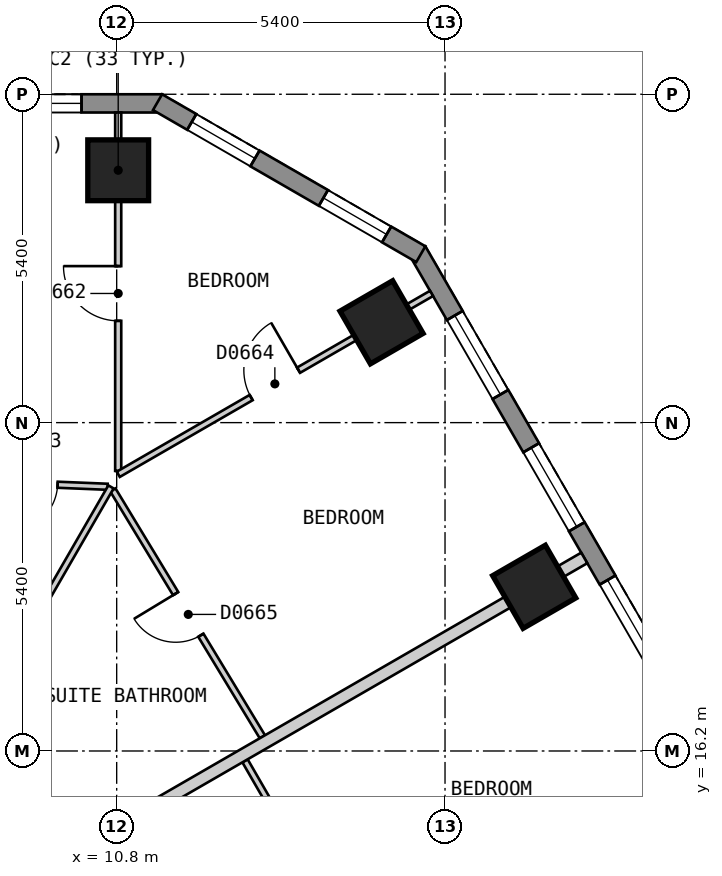
"""IFC4 building model, lengths in metres.
Left out: names, types, materials, properties, quantities, classifications, styles, units other than length and angle.
Written with IfcOpenShell. Run it as: python <this file> out.ifc"""

import sys

from ifc_helpers import new_model, si_unit, direction, frame, frame_2d, origin, origin_2d, place, context, subcontext, project, spatial, polyline, rectangle, outline, extrude, element, fill, save


model = new_model("IFC4")
c1 = context("Model", 3, precision=1e-05, world=origin(), true_north=direction((0.0, 1.0)))
c2 = subcontext(c1, "Body", "Model", "MODEL_VIEW")
j1 = project(units=[si_unit("LENGTHUNIT", "METRE"), si_unit("PLANEANGLEUNIT", "RADIAN")], contexts=[c1])
p1 = place(None, origin())
s1 = spatial("IfcSite", under=j1, at=p1, CompositionType="ELEMENT")
p2 = place(p1, origin())
s2 = spatial("IfcBuilding", under=s1, at=p2, CompositionType="ELEMENT")
p3 = place(p2, frame((0.0, 0.0, 81.0)))
s3 = spatial("IfcBuildingStorey", under=s2, at=p3, CompositionType="ELEMENT", Elevation=81.0)
for number, where, z_axis, x_axis in (
    (1, (10.825, 25.75, 0.0), (0.0, 0.0, 1.0), (-1.0, 0.0, 0.0)),
    (2, (17.667, 18.9, 0.0), (0.0, 0.0, 1.0), (-0.5, 0.866, 0.0)),
    (3, (15.156, 23.25, 0.0), (0.0, 0.0, 1.0), (-0.5, 0.866, 0.0)),
):
    element("IfcColumn", number, at=place(p3, frame(where, z_axis=z_axis, x_axis=x_axis)), inside=s3, PredefinedType="COLUMN", context=c2, shape_type="SweptSolid", body=[
        extrude(rectangle(XDim=1.0, YDim=1.0, at=origin_2d()), origin(), (0.0, 0.0, 1.0), 3.0),
    ])
p4 = place(p3, frame((11.547, 26.85, 0.0), z_axis=(0.0, 0.0, 1.0), x_axis=(-1.0, 0.0, 0.0)))
e4 = element("IfcWall", 4, at=p4, inside=s3, PredefinedType="SOLIDWALL", context=c2, shape_type="SweptSolid", body=[
    extrude(outline(polyline([(0.0, -0.15), (23.094, -0.15), (23.014, 0.15), (0.08, 0.15), (0.0, -0.15)])), origin(), (0.0, 0.0, 1.0), 2.7),
])
p5 = place(p4, frame((1.325, 0.0, 0.15)))
e5 = element("IfcOpeningElement", 5, at=p5, cuts=e4, PredefinedType="OPENING", context=c2, shape_type="SweptSolid", body=[
    extrude(rectangle(XDim=1.5, YDim=2.1, at=frame_2d((0.75, 1.05))), frame((0.0, 0.16, 0.0), z_axis=(0.0, -1.0, 0.0), x_axis=(1.0, 0.0, 0.0)), (0.0, 0.0, 1.0), 0.32),
])
p6 = place(p4, frame((4.032, 0.0, 0.15)))
e6 = element("IfcOpeningElement", 6, at=p6, cuts=e4, PredefinedType="OPENING", context=c2, shape_type="SweptSolid", body=[
    extrude(rectangle(XDim=1.5, YDim=2.1, at=frame_2d((0.75, 1.05))), frame((0.0, 0.16, 0.0), z_axis=(0.0, -1.0, 0.0), x_axis=(1.0, 0.0, 0.0)), (0.0, 0.0, 1.0), 0.32),
])
p7 = place(p4, frame((6.738, 0.0, 0.15)))
e7 = element("IfcOpeningElement", 7, at=p7, cuts=e4, PredefinedType="OPENING", context=c2, shape_type="SweptSolid", body=[
    extrude(rectangle(XDim=1.5, YDim=2.1, at=frame_2d((0.75, 1.05))), frame((0.0, 0.16, 0.0), z_axis=(0.0, -1.0, 0.0), x_axis=(1.0, 0.0, 0.0)), (0.0, 0.0, 1.0), 0.32),
])
p8 = place(p4, frame((9.445, 0.0, 0.15)))
e8 = element("IfcOpeningElement", 8, at=p8, cuts=e4, PredefinedType="OPENING", context=c2, shape_type="SweptSolid", body=[
    extrude(rectangle(XDim=1.5, YDim=2.1, at=frame_2d((0.75, 1.05))), frame((0.0, 0.16, 0.0), z_axis=(0.0, -1.0, 0.0), x_axis=(1.0, 0.0, 0.0)), (0.0, 0.0, 1.0), 0.32),
])
p9 = place(p4, frame((12.151, 0.0, 0.15)))
e9 = element("IfcOpeningElement", 9, at=p9, cuts=e4, PredefinedType="OPENING", context=c2, shape_type="SweptSolid", body=[
    extrude(rectangle(XDim=1.5, YDim=2.1, at=frame_2d((0.75, 1.05))), frame((0.0, 0.16, 0.0), z_axis=(0.0, -1.0, 0.0), x_axis=(1.0, 0.0, 0.0)), (0.0, 0.0, 1.0), 0.32),
])
p10 = place(p4, frame((14.858, 0.0, 0.15)))
e10 = element("IfcOpeningElement", 10, at=p10, cuts=e4, PredefinedType="OPENING", context=c2, shape_type="SweptSolid", body=[
    extrude(rectangle(XDim=1.5, YDim=2.1, at=frame_2d((0.75, 1.05))), frame((0.0, 0.16, 0.0), z_axis=(0.0, -1.0, 0.0), x_axis=(1.0, 0.0, 0.0)), (0.0, 0.0, 1.0), 0.32),
])
p11 = place(p4, frame((17.564, 0.0, 0.15)))
e11 = element("IfcOpeningElement", 11, at=p11, cuts=e4, PredefinedType="OPENING", context=c2, shape_type="SweptSolid", body=[
    extrude(rectangle(XDim=1.5, YDim=2.1, at=frame_2d((0.75, 1.05))), frame((0.0, 0.16, 0.0), z_axis=(0.0, -1.0, 0.0), x_axis=(1.0, 0.0, 0.0)), (0.0, 0.0, 1.0), 0.32),
])
p12 = place(p4, frame((20.271, 0.0, 0.15)))
e12 = element("IfcOpeningElement", 12, at=p12, cuts=e4, PredefinedType="OPENING", context=c2, shape_type="SweptSolid", body=[
    extrude(rectangle(XDim=1.5, YDim=2.1, at=frame_2d((0.75, 1.05))), frame((0.0, 0.16, 0.0), z_axis=(0.0, -1.0, 0.0), x_axis=(1.0, 0.0, 0.0)), (0.0, 0.0, 1.0), 0.32),
])
p13 = place(p3, frame((29.027, 1.425, 0.0), z_axis=(0.0, 0.0, 1.0), x_axis=(-0.500027479704, 0.866009537788, 0.0)))
e13 = element("IfcWall", 13, at=p13, inside=s3, PredefinedType="SOLIDWALL", context=c2, shape_type="SweptSolid", body=[
    extrude(outline(polyline([(0.0, -0.15), (26.559, -0.15), (26.478, 0.15), (0.08, 0.15), (0.0, -0.15)])), origin(), (0.0, 0.0, 1.0), 2.7),
])
p14 = place(p13, frame((1.227, 0.0, 0.15)))
e14 = element("IfcOpeningElement", 14, at=p14, cuts=e13, PredefinedType="OPENING", context=c2, shape_type="SweptSolid", body=[
    extrude(rectangle(XDim=1.5, YDim=2.1, at=frame_2d((0.75, 1.05))), frame((0.0, 0.16, 0.0), z_axis=(0.0, -1.0, 0.0), x_axis=(1.0, 0.0, 0.0)), (0.0, 0.0, 1.0), 0.32),
])
p15 = place(p13, frame((3.738, 0.0, 0.15)))
e15 = element("IfcOpeningElement", 15, at=p15, cuts=e13, PredefinedType="OPENING", context=c2, shape_type="SweptSolid", body=[
    extrude(rectangle(XDim=1.5, YDim=2.1, at=frame_2d((0.75, 1.05))), frame((0.0, 0.16, 0.0), z_axis=(0.0, -1.0, 0.0), x_axis=(1.0, 0.0, 0.0)), (0.0, 0.0, 1.0), 0.32),
])
p16 = place(p13, frame((6.25, 0.0, 0.15)))
e16 = element("IfcOpeningElement", 16, at=p16, cuts=e13, PredefinedType="OPENING", context=c2, shape_type="SweptSolid", body=[
    extrude(rectangle(XDim=1.5, YDim=2.1, at=frame_2d((0.75, 1.05))), frame((0.0, 0.16, 0.0), z_axis=(0.0, -1.0, 0.0), x_axis=(1.0, 0.0, 0.0)), (0.0, 0.0, 1.0), 0.32),
])
p17 = place(p13, frame((8.761, 0.0, 0.15)))
e17 = element("IfcOpeningElement", 17, at=p17, cuts=e13, PredefinedType="OPENING", context=c2, shape_type="SweptSolid", body=[
    extrude(rectangle(XDim=1.5, YDim=2.1, at=frame_2d((0.75, 1.05))), frame((0.0, 0.16, 0.0), z_axis=(0.0, -1.0, 0.0), x_axis=(1.0, 0.0, 0.0)), (0.0, 0.0, 1.0), 0.32),
])
p18 = place(p13, frame((11.273, 0.0, 0.15)))
e18 = element("IfcOpeningElement", 18, at=p18, cuts=e13, PredefinedType="OPENING", context=c2, shape_type="SweptSolid", body=[
    extrude(rectangle(XDim=1.5, YDim=2.1, at=frame_2d((0.75, 1.05))), frame((0.0, 0.16, 0.0), z_axis=(0.0, -1.0, 0.0), x_axis=(1.0, 0.0, 0.0)), (0.0, 0.0, 1.0), 0.32),
])
p19 = place(p13, frame((13.785, 0.0, 0.15)))
e19 = element("IfcOpeningElement", 19, at=p19, cuts=e13, PredefinedType="OPENING", context=c2, shape_type="SweptSolid", body=[
    extrude(rectangle(XDim=1.5, YDim=2.1, at=frame_2d((0.75, 1.05))), frame((0.0, 0.16, 0.0), z_axis=(0.0, -1.0, 0.0), x_axis=(1.0, 0.0, 0.0)), (0.0, 0.0, 1.0), 0.32),
])
p20 = place(p13, frame((16.296, 0.0, 0.15)))
e20 = element("IfcOpeningElement", 20, at=p20, cuts=e13, PredefinedType="OPENING", context=c2, shape_type="SweptSolid", body=[
    extrude(rectangle(XDim=1.5, YDim=2.1, at=frame_2d((0.75, 1.05))), frame((0.0, 0.16, 0.0), z_axis=(0.0, -1.0, 0.0), x_axis=(1.0, 0.0, 0.0)), (0.0, 0.0, 1.0), 0.32),
])
p21 = place(p13, frame((18.807, 0.0, 0.15)))
e21 = element("IfcOpeningElement", 21, at=p21, cuts=e13, PredefinedType="OPENING", context=c2, shape_type="SweptSolid", body=[
    extrude(rectangle(XDim=1.5, YDim=2.1, at=frame_2d((0.75, 1.05))), frame((0.0, 0.16, 0.0), z_axis=(0.0, -1.0, 0.0), x_axis=(1.0, 0.0, 0.0)), (0.0, 0.0, 1.0), 0.32),
])
p22 = place(p13, frame((21.319, 0.0, 0.15)))
e22 = element("IfcOpeningElement", 22, at=p22, cuts=e13, PredefinedType="OPENING", context=c2, shape_type="SweptSolid", body=[
    extrude(rectangle(XDim=1.5, YDim=2.1, at=frame_2d((0.75, 1.05))), frame((0.0, 0.16, 0.0), z_axis=(0.0, -1.0, 0.0), x_axis=(1.0, 0.0, 0.0)), (0.0, 0.0, 1.0), 0.32),
])
p23 = place(p13, frame((23.831, 0.0, 0.15)))
e23 = element("IfcOpeningElement", 23, at=p23, cuts=e13, PredefinedType="OPENING", context=c2, shape_type="SweptSolid", body=[
    extrude(rectangle(XDim=1.5, YDim=2.1, at=frame_2d((0.75, 1.05))), frame((0.0, 0.16, 0.0), z_axis=(0.0, -1.0, 0.0), x_axis=(1.0, 0.0, 0.0)), (0.0, 0.0, 1.0), 0.32),
])
p24 = place(p3, frame((15.802, 24.37, 0.0), z_axis=(0.0, 0.0, 1.0), x_axis=(-0.866022959057, 0.500004234368, 0.0)))
e24 = element("IfcWall", 24, at=p24, inside=s3, PredefinedType="SOLIDWALL", context=c2, shape_type="SweptSolid", body=[
    extrude(outline(polyline([(0.0, -0.15), (5.0, -0.15), (4.92, 0.15), (0.08, 0.15), (0.0, -0.15)])), origin(), (0.0, 0.0, 1.0), 2.7),
])
p25 = place(p24, frame((0.65, 0.0, 0.15)))
e25 = element("IfcOpeningElement", 25, at=p25, cuts=e24, PredefinedType="OPENING", context=c2, shape_type="SweptSolid", body=[
    extrude(rectangle(XDim=1.2, YDim=2.1, at=frame_2d((0.6, 1.05))), frame((0.0, 0.16, 0.0), z_axis=(0.0, -1.0, 0.0), x_axis=(1.0, 0.0, 0.0)), (0.0, 0.0, 1.0), 0.32),
])
p26 = place(p24, frame((3.15, 0.0, 0.15)))
e26 = element("IfcOpeningElement", 26, at=p26, cuts=e24, PredefinedType="OPENING", context=c2, shape_type="SweptSolid", body=[
    extrude(rectangle(XDim=1.2, YDim=2.1, at=frame_2d((0.6, 1.05))), frame((0.0, 0.16, 0.0), z_axis=(0.0, -1.0, 0.0), x_axis=(1.0, 0.0, 0.0)), (0.0, 0.0, 1.0), 0.32),
])
p27 = place(p3, frame((8.488, 16.5, 0.0), z_axis=(0.0, 0.0, 1.0), x_axis=(0.499986836607, -0.86603300354, 0.0)))
e27 = element("IfcWall", 27, at=p27, inside=s3, PredefinedType="PARTITIONING", context=c2, shape_type="SweptSolid", body=[
    extrude(rectangle(XDim=20.09, YDim=0.2, at=frame_2d((10.045, 0.0))), origin(), (0.0, 0.0, 1.0), 2.7),
])
p28 = place(p27, frame((14.569, 0.0, 0.0)))
e28 = element("IfcOpeningElement", 28, at=p28, cuts=e27, PredefinedType="OPENING", context=c2, shape_type="SweptSolid", body=[
    extrude(rectangle(XDim=1.0, YDim=2.1, at=frame_2d((0.5, 1.05))), frame((0.0, 0.11, 0.0), z_axis=(0.0, -1.0, 0.0), x_axis=(1.0, 0.0, 0.0)), (0.0, 0.0, 1.0), 0.22),
])
p29 = place(p3, frame((10.738, 20.492, 0.0), z_axis=(0.0, 0.0, 1.0), x_axis=(0.518100976056, -0.855319459974, 0.0)))
e29 = element("IfcWall", 29, at=p29, inside=s3, PredefinedType="PARTITIONING", context=c2, shape_type="SweptSolid", body=[
    extrude(rectangle(XDim=4.744, YDim=0.1, at=frame_2d((2.372, 0.0))), origin(), (0.0, 0.0, 1.0), 2.7),
])
p30 = place(p29, frame((1.992, 0.0, 0.0)))
e30 = element("IfcOpeningElement", 30, at=p30, cuts=e29, PredefinedType="OPENING", context=c2, shape_type="SweptSolid", body=[
    extrude(rectangle(XDim=0.8, YDim=2.1, at=frame_2d((0.4, 1.05))), frame((0.0, 0.06, 0.0), z_axis=(0.0, -1.0, 0.0), x_axis=(1.0, 0.0, 0.0)), (0.0, 0.0, 1.0), 0.12),
])
p31 = place(p3, frame((12.911, 16.038, 0.0), z_axis=(0.0, 0.0, 1.0), x_axis=(0.499974319101, -0.866040230151, 0.0)))
e31 = element("IfcWall", 31, at=p31, inside=s3, PredefinedType="PARTITIONING", context=c2, shape_type="SweptSolid", body=[
    extrude(rectangle(XDim=4.923, YDim=0.1, at=frame_2d((2.461, 0.0))), origin(), (0.0, 0.0, 1.0), 2.7),
])
p32 = place(p31, frame((2.012, 0.0, 0.0)))
e32 = element("IfcOpeningElement", 32, at=p32, cuts=e31, PredefinedType="OPENING", context=c2, shape_type="SweptSolid", body=[
    extrude(rectangle(XDim=0.8, YDim=2.1, at=frame_2d((0.4, 1.05))), frame((0.0, 0.06, 0.0), z_axis=(0.0, -1.0, 0.0), x_axis=(1.0, 0.0, 0.0)), (0.0, 0.0, 1.0), 0.12),
])
p33 = place(p3, frame((8.151, 20.647, 0.0), z_axis=(0.0, 0.0, 1.0), x_axis=(0.999167241152, -0.040802257405, 0.0)))
e33 = element("IfcWall", 33, at=p33, inside=s3, PredefinedType="PARTITIONING", context=c2, shape_type="SweptSolid", body=[
    extrude(rectangle(XDim=2.501, YDim=0.1, at=frame_2d((1.25, 0.0))), origin(), (0.0, 0.0, 1.0), 2.7),
])
p34 = place(p33, frame((0.879, 0.0, 0.0)))
e34 = element("IfcOpeningElement", 34, at=p34, cuts=e33, PredefinedType="OPENING", context=c2, shape_type="SweptSolid", body=[
    extrude(rectangle(XDim=0.8, YDim=2.1, at=frame_2d((0.4, 1.05))), frame((0.0, 0.06, 0.0), z_axis=(0.0, -1.0, 0.0), x_axis=(1.0, 0.0, 0.0)), (0.0, 0.0, 1.0), 0.12),
])
p35 = place(p3, frame((8.43, 16.6, 0.0), z_axis=(0.0, 0.0, 1.0), x_axis=(0.499951460778, 0.866053426104, 0.0)))
e35 = element("IfcWall", 35, at=p35, inside=s3, PredefinedType="PARTITIONING", context=c2, shape_type="SweptSolid", body=[
    extrude(rectangle(XDim=4.553, YDim=0.1, at=frame_2d((2.276, 0.0))), origin(), (0.0, 0.0, 1.0), 2.7),
])
p36 = place(p3, frame((10.825, 20.806, 0.0), z_axis=(0.0, 0.0, 1.0), x_axis=(0.0, 1.0, 0.0)))
e36 = element("IfcWall", 36, at=p36, inside=s3, PredefinedType="PARTITIONING", context=c2, shape_type="SweptSolid", body=[
    extrude(rectangle(XDim=5.894, YDim=0.1, at=frame_2d((2.947, 0.0))), origin(), (0.0, 0.0, 1.0), 2.7),
])
p37 = place(p36, frame((2.468, 0.0, 0.0)))
e37 = element("IfcOpeningElement", 37, at=p37, cuts=e36, PredefinedType="OPENING", context=c2, shape_type="SweptSolid", body=[
    extrude(rectangle(XDim=0.9, YDim=2.1, at=frame_2d((0.45, 1.05))), frame((0.0, 0.06, 0.0), z_axis=(0.0, -1.0, 0.0), x_axis=(1.0, 0.0, 0.0)), (0.0, 0.0, 1.0), 0.12),
])
p38 = place(p3, frame((10.826, 20.75, 0.0), z_axis=(0.0, 0.0, 1.0), x_axis=(0.865986712877, 0.50006700863, 0.0)))
e38 = element("IfcWall", 38, at=p38, inside=s3, PredefinedType="PARTITIONING", context=c2, shape_type="SweptSolid", body=[
    extrude(rectangle(XDim=5.949, YDim=0.1, at=frame_2d((2.975, 0.0))), origin(), (0.0, 0.0, 1.0), 2.7),
])
p39 = place(p38, frame((2.524, 0.0, 0.0)))
e39 = element("IfcOpeningElement", 39, at=p39, cuts=e38, PredefinedType="OPENING", context=c2, shape_type="SweptSolid", body=[
    extrude(rectangle(XDim=0.9, YDim=2.1, at=frame_2d((0.45, 1.05))), frame((0.0, 0.06, 0.0), z_axis=(0.0, -1.0, 0.0), x_axis=(1.0, 0.0, 0.0)), (0.0, 0.0, 1.0), 0.12),
])
p40 = place(p3, frame((9.83, 14.375, 0.0), z_axis=(0.0, 0.0, 1.0), x_axis=(0.866016855193, 0.500014806302, 0.0)))
e40 = element("IfcWall", 40, at=p40, inside=s3, PredefinedType="PARTITIONING", context=c2, shape_type="SweptSolid", body=[
    extrude(rectangle(XDim=10.0, YDim=0.2, at=frame_2d((5.0, 0.0))), origin(), (0.0, 0.0, 1.0), 2.7),
])
p41 = place(p5, origin())
e41 = element("IfcWindow", 41, at=p41, inside=s3, PartitioningType="SINGLE_PANEL", PredefinedType="WINDOW", context=c2, shape_type="SweptSolid", body=[
    extrude(rectangle(XDim=1.5, YDim=2.1, at=frame_2d((0.75, 1.05))), frame((0.0, 0.03, 0.0), z_axis=(0.0, -1.0, 0.0), x_axis=(1.0, 0.0, 0.0)), (0.0, 0.0, 1.0), 0.06),
])
fill(e5, e41)
p42 = place(p21, origin())
e42 = element("IfcWindow", 42, at=p42, inside=s3, PartitioningType="SINGLE_PANEL", PredefinedType="WINDOW", context=c2, shape_type="SweptSolid", body=[
    extrude(rectangle(XDim=1.5, YDim=2.1, at=frame_2d((0.75, 1.05))), frame((0.0, 0.03, 0.0), z_axis=(0.0, -1.0, 0.0), x_axis=(1.0, 0.0, 0.0)), (0.0, 0.0, 1.0), 0.06),
])
fill(e21, e42)
p43 = place(p22, origin())
e43 = element("IfcWindow", 43, at=p43, inside=s3, PartitioningType="SINGLE_PANEL", PredefinedType="WINDOW", context=c2, shape_type="SweptSolid", body=[
    extrude(rectangle(XDim=1.5, YDim=2.1, at=frame_2d((0.75, 1.05))), frame((0.0, 0.03, 0.0), z_axis=(0.0, -1.0, 0.0), x_axis=(1.0, 0.0, 0.0)), (0.0, 0.0, 1.0), 0.06),
])
fill(e22, e43)
p44 = place(p23, origin())
e44 = element("IfcWindow", 44, at=p44, inside=s3, PartitioningType="SINGLE_PANEL", PredefinedType="WINDOW", context=c2, shape_type="SweptSolid", body=[
    extrude(rectangle(XDim=1.5, YDim=2.1, at=frame_2d((0.75, 1.05))), frame((0.0, 0.03, 0.0), z_axis=(0.0, -1.0, 0.0), x_axis=(1.0, 0.0, 0.0)), (0.0, 0.0, 1.0), 0.06),
])
fill(e23, e44)
p45 = place(p25, origin())
e45 = element("IfcWindow", 45, at=p45, inside=s3, PartitioningType="SINGLE_PANEL", PredefinedType="WINDOW", context=c2, shape_type="SweptSolid", body=[
    extrude(rectangle(XDim=1.2, YDim=2.1, at=frame_2d((0.6, 1.05))), frame((0.0, 0.03, 0.0), z_axis=(0.0, -1.0, 0.0), x_axis=(1.0, 0.0, 0.0)), (0.0, 0.0, 1.0), 0.06),
])
fill(e25, e45)
p46 = place(p26, origin())
e46 = element("IfcWindow", 46, at=p46, inside=s3, PartitioningType="SINGLE_PANEL", PredefinedType="WINDOW", context=c2, shape_type="SweptSolid", body=[
    extrude(rectangle(XDim=1.2, YDim=2.1, at=frame_2d((0.6, 1.05))), frame((0.0, 0.03, 0.0), z_axis=(0.0, -1.0, 0.0), x_axis=(1.0, 0.0, 0.0)), (0.0, 0.0, 1.0), 0.06),
])
fill(e26, e46)
p47 = place(p37, origin())
e47 = element("IfcDoor", 47, at=p47, inside=s3, OperationType="SINGLE_SWING_RIGHT", PredefinedType="DOOR", context=c2, shape_type="SweptSolid", body=[
    extrude(rectangle(XDim=0.9, YDim=2.1, at=frame_2d((0.45, 1.05))), frame((0.0, 0.025, 0.0), z_axis=(0.0, -1.0, 0.0), x_axis=(1.0, 0.0, 0.0)), (0.0, 0.0, 1.0), 0.05),
])
fill(e37, e47)
p48 = place(p34, origin())
e48 = element("IfcDoor", 48, at=p48, inside=s3, OperationType="SINGLE_SWING_LEFT", PredefinedType="DOOR", context=c2, shape_type="SweptSolid", body=[
    extrude(rectangle(XDim=0.8, YDim=2.1, at=frame_2d((0.4, 1.05))), frame((0.0, 0.025, 0.0), z_axis=(0.0, -1.0, 0.0), x_axis=(1.0, 0.0, 0.0)), (0.0, 0.0, 1.0), 0.05),
])
fill(e34, e48)
p49 = place(p39, origin())
e49 = element("IfcDoor", 49, at=p49, inside=s3, OperationType="SINGLE_SWING_RIGHT", PredefinedType="DOOR", context=c2, shape_type="SweptSolid", body=[
    extrude(rectangle(XDim=0.9, YDim=2.1, at=frame_2d((0.45, 1.05))), frame((0.0, 0.025, 0.0), z_axis=(0.0, -1.0, 0.0), x_axis=(1.0, 0.0, 0.0)), (0.0, 0.0, 1.0), 0.05),
])
fill(e39, e49)
p50 = place(p30, origin())
e50 = element("IfcDoor", 50, at=p50, inside=s3, OperationType="SINGLE_SWING_LEFT", PredefinedType="DOOR", context=c2, shape_type="SweptSolid", body=[
    extrude(rectangle(XDim=0.8, YDim=2.1, at=frame_2d((0.4, 1.05))), frame((0.0, 0.025, 0.0), z_axis=(0.0, -1.0, 0.0), x_axis=(1.0, 0.0, 0.0)), (0.0, 0.0, 1.0), 0.05),
])
fill(e30, e50)
save(model, sys.argv[1])
